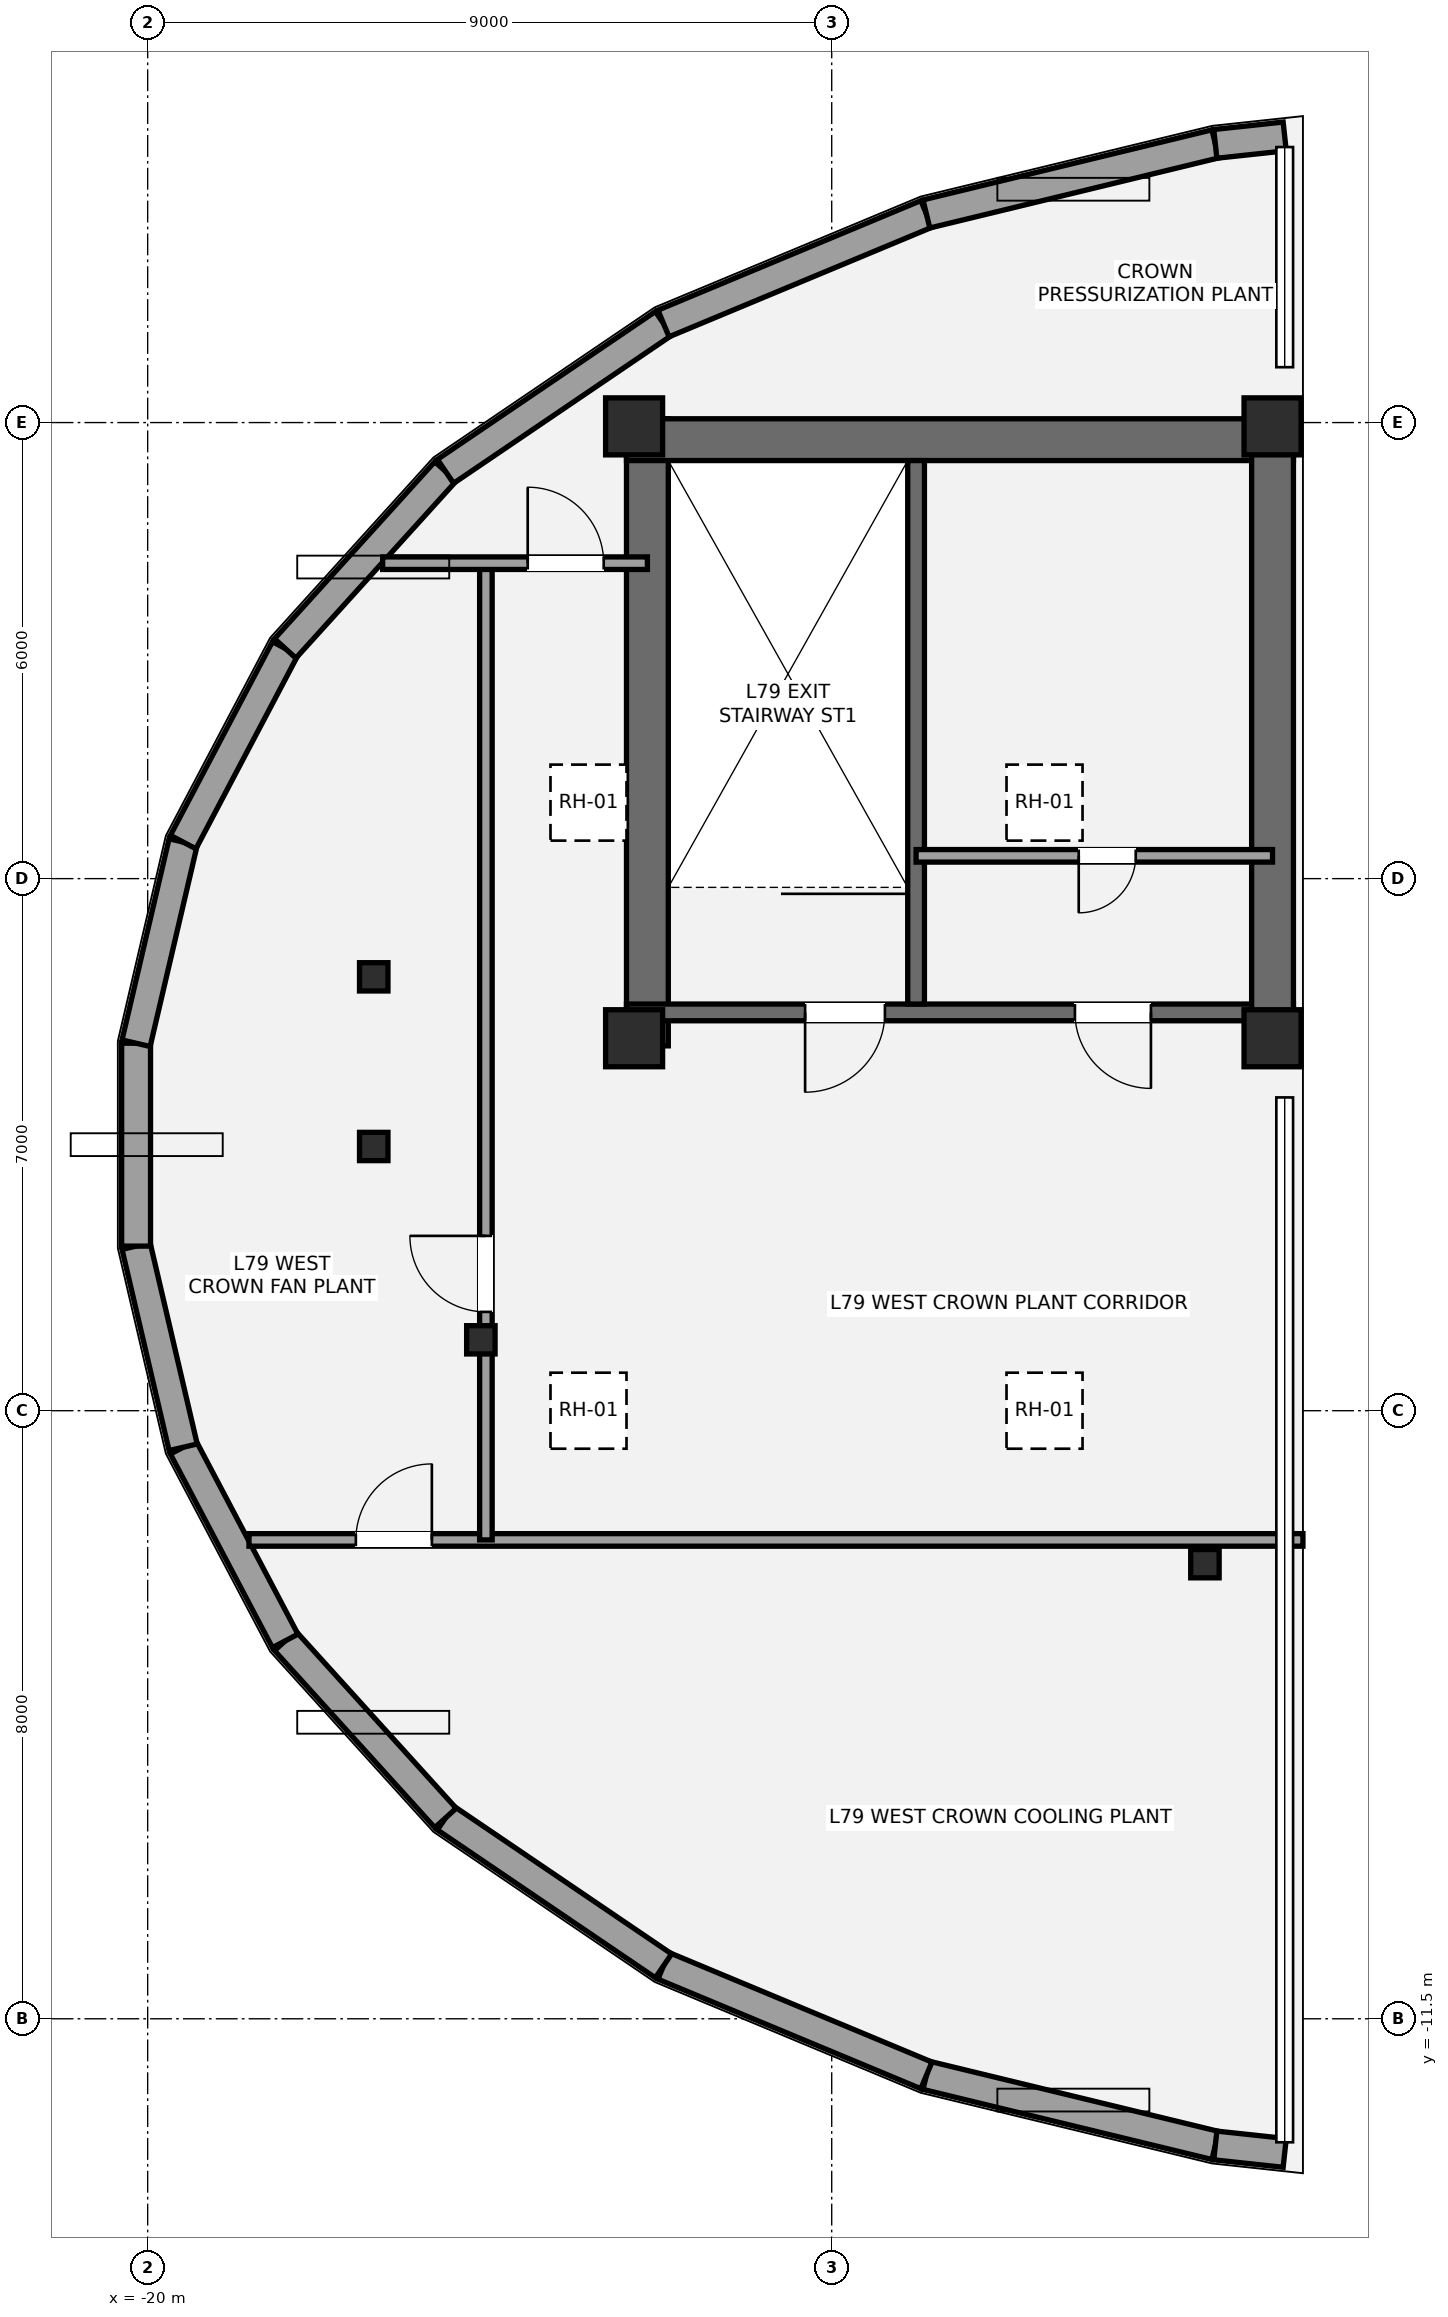
"""IFC4 building model, lengths in metres.
Left out: names, types, materials, properties, quantities, classifications, styles, units other than length and angle.
Written with IfcOpenShell. Run it as: python <this file> out.ifc"""

import sys

from ifc_helpers import new_model, si_unit, direction, frame, frame_2d, origin, origin_2d, place, context, subcontext, project, spatial, rectangle, i_section, extrude, element, fill, save


model = new_model("IFC4")
c1 = context("Model", 3, precision=1e-05, world=origin(), true_north=direction((0.0, 1.0)))
c2 = subcontext(c1, "Body", "Model", "MODEL_VIEW")
j1 = project(units=[si_unit("LENGTHUNIT", "METRE"), si_unit("PLANEANGLEUNIT", "RADIAN")], contexts=[c1])
p1 = place(None, origin())
s1 = spatial("IfcSite", under=j1, at=p1, CompositionType="ELEMENT")
p2 = place(p1, origin())
s2 = spatial("IfcBuilding", under=s1, at=p2, CompositionType="ELEMENT")
p3 = place(p2, frame((0.0, 0.0, 280.6)))
s3 = spatial("IfcBuildingStorey", under=s2, at=p3, CompositionType="ELEMENT", Elevation=280.6)
p4 = place(p3, frame((-13.425, 1.3, 0.0), z_axis=(0.0, 0.0, 1.0), x_axis=(0.0, 1.0, 0.0)))
e1 = element("IfcWall", 1, at=p4, inside=s3, PredefinedType="SHEAR", context=c2, shape_type="SweptSolid", body=[
    extrude(rectangle(XDim=8.25, YDim=0.55, at=frame_2d((4.125, 0.0))), origin(), (0.0, 0.0, 1.0), 3.8),
])
p5 = place(p3, frame((-13.7, 9.275, 0.0), z_axis=(0.0, 0.0, 1.0), x_axis=(1.0, 0.0, 0.0)))
e2 = element("IfcWall", 2, at=p5, inside=s3, PredefinedType="SHEAR", context=c2, shape_type="SweptSolid", body=[
    extrude(rectangle(XDim=8.775, YDim=0.55, at=frame_2d((4.387, 0.0))), origin(), (0.0, 0.0, 1.0), 3.8),
])
p6 = place(p3, frame((-4.925, 1.74, 0.0), z_axis=(0.0, 0.0, 1.0), x_axis=(-1.0, 0.0, 0.0)))
e3 = element("IfcWall", 3, at=p6, inside=s3, PredefinedType="SHEAR", context=c2, shape_type="SweptSolid", body=[
    extrude(rectangle(XDim=8.775, YDim=0.22, at=frame_2d((4.387, 0.0))), origin(), (0.0, 0.0, 1.0), 3.8),
])
p7 = place(p6, frame((5.375, 0.0, 0.0)))
e4 = element("IfcOpeningElement", 4, at=p7, cuts=e3, PredefinedType="OPENING", context=c2, shape_type="SweptSolid", body=[
    extrude(rectangle(XDim=1.05, YDim=2.15, at=frame_2d((0.525, 1.075))), frame((0.0, 0.12, 0.0), z_axis=(0.0, -1.0, 0.0), x_axis=(1.0, 0.0, 0.0)), (0.0, 0.0, 1.0), 0.24),
])
p8 = place(p6, frame((1.875, 0.0, 0.0)))
e5 = element("IfcOpeningElement", 5, at=p8, cuts=e3, PredefinedType="OPENING", context=c2, shape_type="SweptSolid", body=[
    extrude(rectangle(XDim=1.0, YDim=2.15, at=frame_2d((0.5, 1.075))), frame((0.0, 0.12, 0.0), z_axis=(0.0, -1.0, 0.0), x_axis=(1.0, 0.0, 0.0)), (0.0, 0.0, 1.0), 0.24),
])
p9 = place(p3, frame((-5.2, 1.3, 0.0), z_axis=(0.0, 0.0, 1.0), x_axis=(0.0, 1.0, 0.0)))
e6 = element("IfcWall", 6, at=p9, inside=s3, PredefinedType="SHEAR", context=c2, shape_type="SweptSolid", body=[
    extrude(rectangle(XDim=8.25, YDim=0.55, at=frame_2d((4.125, 0.0))), origin(), (0.0, 0.0, 1.0), 3.8),
])
p10 = place(p3, frame((-9.89, 1.85, 0.0), z_axis=(0.0, 0.0, 1.0), x_axis=(0.0, 1.0, 0.0)))
e7 = element("IfcWall", 7, at=p10, inside=s3, PredefinedType="SHEAR", context=c2, shape_type="SweptSolid", body=[
    extrude(rectangle(XDim=7.15, YDim=0.22, at=frame_2d((3.575, 0.0))), origin(), (0.0, 0.0, 1.0), 3.8),
])
for number, where, z_axis, x_axis in (
    (8, (-13.6, 1.4, 0.0), (0.0, 0.0, 1.0), (1.0, 0.0, 0.0)),
    (9, (-13.6, 9.45, 0.0), (0.0, 0.0, 1.0), (1.0, 0.0, 0.0)),
    (10, (-5.2, 1.4, 0.0), (0.0, 0.0, 1.0), (1.0, 0.0, 0.0)),
    (11, (-5.2, 9.45, 0.0), (0.0, 0.0, 1.0), (1.0, 0.0, 0.0)),
):
    element("IfcColumn", number, at=place(p3, frame(where, z_axis=z_axis, x_axis=x_axis)), inside=s3, PredefinedType="PILASTER", context=c2, shape_type="SweptSolid", body=[
        extrude(rectangle(XDim=0.75, YDim=0.75, at=origin_2d()), origin(), (0.0, 0.0, 1.0), 3.8),
    ])
for number, where, z_axis, x_axis in (
    (12, (-17.026, 2.208, 0.0), (0.0, 0.0, 1.0), (1.0, 0.0, 0.0)),
    (13, (-17.026, -0.024, 0.0), (0.0, 0.0, 1.0), (1.0, 0.0, 0.0)),
    (14, (-15.616, -2.567, 0.0), (0.0, 0.0, 1.0), (1.0, 0.0, 0.0)),
    (15, (-6.09, -5.513, 0.0), (0.0, 0.0, 1.0), (1.0, 0.0, 0.0)),
):
    element("IfcColumn", number, at=place(p3, frame(where, z_axis=z_axis, x_axis=x_axis)), inside=s3, PredefinedType="COLUMN", context=c2, shape_type="SweptSolid", body=[
        extrude(i_section(OverallWidth=0.374, OverallDepth=0.372, WebThickness=0.016, FlangeThickness=0.026, at=origin_2d()), origin(), (0.0, 0.0, 1.0), 3.8),
    ])
p11 = place(p3, frame((-9.754, -12.245, 0.0), z_axis=(0.0, 0.0, 1.0), x_axis=(0.971829314356, -0.235685773347, 0.0)))
e16 = element("IfcWall", 16, at=p11, inside=s3, PredefinedType="ELEMENTEDWALL", context=c2, shape_type="SweptSolid", body=[
    extrude(rectangle(XDim=3.911, YDim=0.38, at=frame_2d((1.956, 0.0))), origin(), (0.0, 0.0, 1.0), 2.97),
])
p12 = place(p3, frame((-13.213, -10.804, 0.0), z_axis=(0.0, 0.0, 1.0), x_axis=(0.923107762436, -0.384541361794, 0.0)))
e17 = element("IfcWall", 17, at=p12, inside=s3, PredefinedType="ELEMENTEDWALL", context=c2, shape_type="SweptSolid", body=[
    extrude(rectangle(XDim=3.747, YDim=0.38, at=frame_2d((1.874, 0.0))), origin(), (0.0, 0.0, 1.0), 2.97),
])
p13 = place(p3, frame((-16.082, -8.858, 0.0), z_axis=(0.0, 0.0, 1.0), x_axis=(0.827591474152, -0.561330875608, 0.0)))
e18 = element("IfcWall", 18, at=p13, inside=s3, PredefinedType="ELEMENTEDWALL", context=c2, shape_type="SweptSolid", body=[
    extrude(rectangle(XDim=3.466, YDim=0.38, at=frame_2d((1.733, 0.0))), origin(), (0.0, 0.0, 1.0), 2.97),
])
p14 = place(p3, frame((-18.191, -6.529, 0.0), z_axis=(0.0, 0.0, 1.0), x_axis=(0.671159432859, -0.741313034881, 0.0)))
e19 = element("IfcWall", 19, at=p14, inside=s3, PredefinedType="ELEMENTEDWALL", context=c2, shape_type="SweptSolid", body=[
    extrude(rectangle(XDim=3.143, YDim=0.38, at=frame_2d((1.571, 0.0))), origin(), (0.0, 0.0, 1.0), 2.97),
])
p15 = place(p3, frame((-19.533, -3.981, 0.0), z_axis=(0.0, 0.0, 1.0), x_axis=(0.466239076721, -0.884658760957, 0.0)))
e20 = element("IfcWall", 20, at=p15, inside=s3, PredefinedType="ELEMENTEDWALL", context=c2, shape_type="SweptSolid", body=[
    extrude(rectangle(XDim=2.879, YDim=0.38, at=frame_2d((1.44, 0.0))), origin(), (0.0, 0.0, 1.0), 2.97),
])
p16 = place(p3, frame((-20.152, -1.335, 0.0), z_axis=(0.0, 0.0, 1.0), x_axis=(0.227797493786, -0.973708530221, 0.0)))
e21 = element("IfcWall", 21, at=p16, inside=s3, PredefinedType="ELEMENTEDWALL", context=c2, shape_type="SweptSolid", body=[
    extrude(rectangle(XDim=2.718, YDim=0.38, at=frame_2d((1.359, 0.0))), origin(), (0.0, 0.0, 1.0), 2.97),
])
p17 = place(p3, frame((-20.152, 1.335, 0.0), z_axis=(0.0, 0.0, 1.0), x_axis=(0.0, -1.0, 0.0)))
e22 = element("IfcWall", 22, at=p17, inside=s3, PredefinedType="ELEMENTEDWALL", context=c2, shape_type="SweptSolid", body=[
    extrude(rectangle(XDim=2.669, YDim=0.38, at=frame_2d((1.335, 0.0))), origin(), (0.0, 0.0, 1.0), 2.97),
])
p18 = place(p3, frame((-19.533, 3.981, 0.0), z_axis=(0.0, 0.0, 1.0), x_axis=(-0.227797493786, -0.973708530221, 0.0)))
e23 = element("IfcWall", 23, at=p18, inside=s3, PredefinedType="ELEMENTEDWALL", context=c2, shape_type="SweptSolid", body=[
    extrude(rectangle(XDim=2.718, YDim=0.38, at=frame_2d((1.359, 0.0))), origin(), (0.0, 0.0, 1.0), 2.97),
])
p19 = place(p3, frame((-18.191, 6.529, 0.0), z_axis=(0.0, 0.0, 1.0), x_axis=(-0.466239076721, -0.884658760957, 0.0)))
e24 = element("IfcWall", 24, at=p19, inside=s3, PredefinedType="ELEMENTEDWALL", context=c2, shape_type="SweptSolid", body=[
    extrude(rectangle(XDim=2.879, YDim=0.38, at=frame_2d((1.44, 0.0))), origin(), (0.0, 0.0, 1.0), 2.97),
])
p20 = place(p3, frame((-16.082, 8.858, 0.0), z_axis=(0.0, 0.0, 1.0), x_axis=(-0.671159432859, -0.741313034881, 0.0)))
e25 = element("IfcWall", 25, at=p20, inside=s3, PredefinedType="ELEMENTEDWALL", context=c2, shape_type="SweptSolid", body=[
    extrude(rectangle(XDim=3.143, YDim=0.38, at=frame_2d((1.571, 0.0))), origin(), (0.0, 0.0, 1.0), 2.97),
])
p21 = place(p3, frame((-13.213, 10.804, 0.0), z_axis=(0.0, 0.0, 1.0), x_axis=(-0.827591474152, -0.561330875608, 0.0)))
e26 = element("IfcWall", 26, at=p21, inside=s3, PredefinedType="ELEMENTEDWALL", context=c2, shape_type="SweptSolid", body=[
    extrude(rectangle(XDim=3.466, YDim=0.38, at=frame_2d((1.733, 0.0))), origin(), (0.0, 0.0, 1.0), 2.97),
])
p22 = place(p3, frame((-9.754, 12.245, 0.0), z_axis=(0.0, 0.0, 1.0), x_axis=(-0.923107762436, -0.384541361794, 0.0)))
e27 = element("IfcWall", 27, at=p22, inside=s3, PredefinedType="ELEMENTEDWALL", context=c2, shape_type="SweptSolid", body=[
    extrude(rectangle(XDim=3.747, YDim=0.38, at=frame_2d((1.874, 0.0))), origin(), (0.0, 0.0, 1.0), 2.97),
])
p23 = place(p3, frame((-5.953, 13.167, 0.0), z_axis=(0.0, 0.0, 1.0), x_axis=(-0.971829314356, -0.235685773347, 0.0)))
e28 = element("IfcWall", 28, at=p23, inside=s3, PredefinedType="ELEMENTEDWALL", context=c2, shape_type="SweptSolid", body=[
    extrude(rectangle(XDim=3.911, YDim=0.38, at=frame_2d((1.956, 0.0))), origin(), (0.0, 0.0, 1.0), 2.97),
])
for number, where, z_axis, x_axis in (
    (29, (-5.04, 13.265, 0.0), (0.0, 0.0, 1.0), (-0.994, -0.107, 0.0)),
    (30, (-5.953, -13.167, 0.0), (0.0, 0.0, 1.0), (0.994, -0.107, 0.0)),
):
    element("IfcWall", number, at=place(p3, frame(where, z_axis=z_axis, x_axis=x_axis)), inside=s3, PredefinedType="ELEMENTEDWALL", context=c2, shape_type="SweptSolid", body=[
        extrude(rectangle(XDim=0.918, YDim=0.38, at=frame_2d((0.459, 0.0))), origin(), (0.0, 0.0, 1.0), 2.97),
    ])
p24 = place(p3, frame((-5.2, 3.8, 0.0), z_axis=(0.0, 0.0, 1.0), x_axis=(-1.0, 0.0, 0.0)))
e31 = element("IfcWall", 31, at=p24, inside=s3, PredefinedType="PARTITIONING", context=c2, shape_type="SweptSolid", body=[
    extrude(rectangle(XDim=4.69, YDim=0.165, at=frame_2d((2.345, 0.0))), origin(), (0.0, 0.0, 1.0), 3.6),
])
p25 = place(p24, frame((1.8, 0.0, 0.0)))
e32 = element("IfcOpeningElement", 32, at=p25, cuts=e31, PredefinedType="OPENING", context=c2, shape_type="SweptSolid", body=[
    extrude(rectangle(XDim=0.75, YDim=2.1, at=frame_2d((0.375, 1.05))), frame((0.0, 0.093, 0.0), z_axis=(0.0, -1.0, 0.0), x_axis=(1.0, 0.0, 0.0)), (0.0, 0.0, 1.0), 0.185),
])
p26 = place(p3, frame((-18.667, -5.2, 0.0), z_axis=(0.0, 0.0, 1.0), x_axis=(1.0, 0.0, 0.0)))
e33 = element("IfcWall", 33, at=p26, inside=s3, PredefinedType="PARTITIONING", context=c2, shape_type="SweptSolid", body=[
    extrude(rectangle(XDim=13.867, YDim=0.165, at=frame_2d((6.934, 0.0))), origin(), (0.0, 0.0, 1.0), 2.987),
])
p27 = place(p26, frame((1.406, 0.0, 0.0)))
e34 = element("IfcOpeningElement", 34, at=p27, cuts=e33, PredefinedType="OPENING", context=c2, shape_type="SweptSolid", body=[
    extrude(rectangle(XDim=1.0, YDim=2.15, at=frame_2d((0.5, 1.075))), frame((0.0, 0.093, 0.0), z_axis=(0.0, -1.0, 0.0), x_axis=(1.0, 0.0, 0.0)), (0.0, 0.0, 1.0), 0.185),
])
p28 = place(p3, frame((-15.55, -5.2, 0.0), z_axis=(0.0, 0.0, 1.0), x_axis=(0.0, 1.0, 0.0)))
e35 = element("IfcWall", 35, at=p28, inside=s3, PredefinedType="PARTITIONING", context=c2, shape_type="SweptSolid", body=[
    extrude(rectangle(XDim=12.85, YDim=0.165, at=frame_2d((6.425, 0.0))), origin(), (0.0, 0.0, 1.0), 2.987),
])
p29 = place(p28, frame((3.0, 0.0, 0.0)))
e36 = element("IfcOpeningElement", 36, at=p29, cuts=e35, PredefinedType="OPENING", context=c2, shape_type="SweptSolid", body=[
    extrude(rectangle(XDim=1.0, YDim=2.15, at=frame_2d((0.5, 1.075))), frame((0.0, 0.093, 0.0), z_axis=(0.0, -1.0, 0.0), x_axis=(1.0, 0.0, 0.0)), (0.0, 0.0, 1.0), 0.185),
])
p30 = place(p3, frame((-16.908, 7.65, 0.0), z_axis=(0.0, 0.0, 1.0), x_axis=(1.0, 0.0, 0.0)))
e37 = element("IfcWall", 37, at=p30, inside=s3, PredefinedType="PARTITIONING", context=c2, shape_type="SweptSolid", body=[
    extrude(rectangle(XDim=3.483, YDim=0.165, at=frame_2d((1.742, 0.0))), origin(), (0.0, 0.0, 1.0), 3.6),
])
p31 = place(p30, frame((1.908, 0.0, 0.0)))
e38 = element("IfcOpeningElement", 38, at=p31, cuts=e37, PredefinedType="OPENING", context=c2, shape_type="SweptSolid", body=[
    extrude(rectangle(XDim=1.0, YDim=2.15, at=frame_2d((0.5, 1.075))), frame((0.0, 0.093, 0.0), z_axis=(0.0, -1.0, 0.0), x_axis=(1.0, 0.0, 0.0)), (0.0, 0.0, 1.0), 0.185),
])
p32 = place(p2, frame((0.0, 0.0, 284.4)))
p33 = place(p32, frame((0.0, 0.0, -0.15)))
p34 = place(p33, frame((-14.2, -3.5, 0.0)))
p35 = place(p34, frame((0.0, 0.0, 0.1)))
e39 = element("IfcDoor", 39, at=p35, inside=s3, OperationType="SINGLE_SWING_LEFT", PredefinedType="TRAPDOOR", context=c2, shape_type="SweptSolid", body=[
    extrude(rectangle(XDim=1.0, YDim=1.0, at=origin_2d()), origin(), (0.0, 0.0, 1.0), 0.05),
])
p36 = place(p33, frame((-14.2, 4.5, 0.0)))
p37 = place(p36, frame((0.0, 0.0, 0.1)))
e40 = element("IfcDoor", 40, at=p37, inside=s3, OperationType="SINGLE_SWING_LEFT", PredefinedType="TRAPDOOR", context=c2, shape_type="SweptSolid", body=[
    extrude(rectangle(XDim=1.0, YDim=1.0, at=origin_2d()), origin(), (0.0, 0.0, 1.0), 0.05),
])
p38 = place(p33, frame((-8.2, -3.5, 0.0)))
p39 = place(p38, frame((0.0, 0.0, 0.1)))
e41 = element("IfcDoor", 41, at=p39, inside=s3, OperationType="SINGLE_SWING_LEFT", PredefinedType="TRAPDOOR", context=c2, shape_type="SweptSolid", body=[
    extrude(rectangle(XDim=1.0, YDim=1.0, at=origin_2d()), origin(), (0.0, 0.0, 1.0), 0.05),
])
p40 = place(p33, frame((-8.2, 4.5, 0.0)))
p41 = place(p40, frame((0.0, 0.0, 0.1)))
e42 = element("IfcDoor", 42, at=p41, inside=s3, OperationType="SINGLE_SWING_LEFT", PredefinedType="TRAPDOOR", context=c2, shape_type="SweptSolid", body=[
    extrude(rectangle(XDim=1.0, YDim=1.0, at=origin_2d()), origin(), (0.0, 0.0, 1.0), 0.05),
])
p42 = place(p7, origin())
e43 = element("IfcDoor", 43, at=p42, inside=s3, OperationType="SINGLE_SWING_RIGHT", PredefinedType="DOOR", context=c2, shape_type="SweptSolid", body=[
    extrude(rectangle(XDim=1.05, YDim=2.15, at=frame_2d((0.525, 1.075))), frame((0.0, 0.025, 0.0), z_axis=(0.0, -1.0, 0.0), x_axis=(1.0, 0.0, 0.0)), (0.0, 0.0, 1.0), 0.05),
])
fill(e4, e43)
p43 = place(p8, origin())
e44 = element("IfcDoor", 44, at=p43, inside=s3, OperationType="SINGLE_SWING_LEFT", PredefinedType="DOOR", context=c2, shape_type="SweptSolid", body=[
    extrude(rectangle(XDim=1.0, YDim=2.15, at=frame_2d((0.5, 1.075))), frame((0.0, 0.025, 0.0), z_axis=(0.0, -1.0, 0.0), x_axis=(1.0, 0.0, 0.0)), (0.0, 0.0, 1.0), 0.05),
])
fill(e5, e44)
p44 = place(p25, origin())
e45 = element("IfcDoor", 45, at=p44, inside=s3, OperationType="SINGLE_SWING_RIGHT", PredefinedType="DOOR", context=c2, shape_type="SweptSolid", body=[
    extrude(rectangle(XDim=0.75, YDim=2.1, at=frame_2d((0.375, 1.05))), frame((0.0, 0.025, 0.0), z_axis=(0.0, -1.0, 0.0), x_axis=(1.0, 0.0, 0.0)), (0.0, 0.0, 1.0), 0.05),
])
fill(e32, e45)
p45 = place(p27, origin())
e46 = element("IfcDoor", 46, at=p45, inside=s3, OperationType="SINGLE_SWING_RIGHT", PredefinedType="DOOR", context=c2, shape_type="SweptSolid", body=[
    extrude(rectangle(XDim=1.0, YDim=2.15, at=frame_2d((0.5, 1.075))), frame((0.0, 0.025, 0.0), z_axis=(0.0, -1.0, 0.0), x_axis=(1.0, 0.0, 0.0)), (0.0, 0.0, 1.0), 0.05),
])
fill(e34, e46)
p46 = place(p29, origin())
e47 = element("IfcDoor", 47, at=p46, inside=s3, OperationType="SINGLE_SWING_RIGHT", PredefinedType="DOOR", context=c2, shape_type="SweptSolid", body=[
    extrude(rectangle(XDim=1.0, YDim=2.15, at=frame_2d((0.5, 1.075))), frame((0.0, 0.025, 0.0), z_axis=(0.0, -1.0, 0.0), x_axis=(1.0, 0.0, 0.0)), (0.0, 0.0, 1.0), 0.05),
])
fill(e36, e47)
p47 = place(p31, origin())
e48 = element("IfcDoor", 48, at=p47, inside=s3, OperationType="SINGLE_SWING_LEFT", PredefinedType="DOOR", context=c2, shape_type="SweptSolid", body=[
    extrude(rectangle(XDim=1.0, YDim=2.15, at=frame_2d((0.5, 1.075))), frame((0.0, 0.025, 0.0), z_axis=(0.0, -1.0, 0.0), x_axis=(1.0, 0.0, 0.0)), (0.0, 0.0, 1.0), 0.05),
])
fill(e38, e48)
save(model, sys.argv[1])
